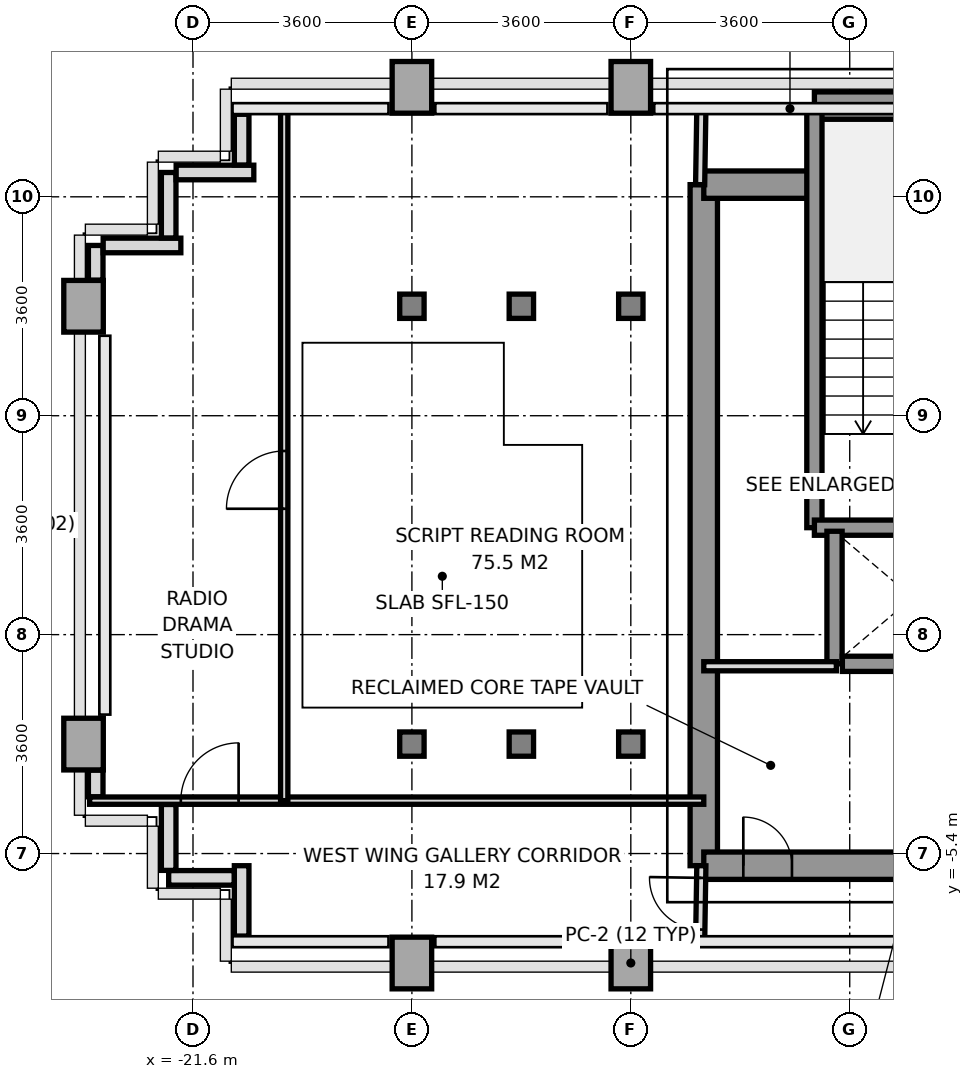
"""IFC4 building model, lengths in metres.
Left out: names, types, materials, properties, quantities, classifications, styles, units other than length and angle.
Written with IfcOpenShell. Run it as: python <this file> out.ifc"""

import sys

from ifc_helpers import new_model, si_unit, direction, frame, frame_2d, origin, origin_2d, place, context, subcontext, project, spatial, rectangle, i_section, extrude, source, transform, mapped, element, fill, save


model = new_model("IFC4")
c1 = context("Model", 3, precision=1e-05, world=origin(), true_north=direction((0.0, 1.0)))
c2 = subcontext(c1, "Body", "Model", "MODEL_VIEW")
j1 = project(units=[si_unit("LENGTHUNIT", "METRE"), si_unit("PLANEANGLEUNIT", "RADIAN")], contexts=[c1])
p1 = place(None, origin())
s1 = spatial("IfcSite", under=j1, at=p1, CompositionType="ELEMENT")
p2 = place(p1, origin())
s2 = spatial("IfcBuilding", under=s1, at=p2, CompositionType="ELEMENT")
p3 = place(p2, frame((0.0, 0.0, 110.8)))
s3 = spatial("IfcBuildingStorey", under=s2, at=p3, CompositionType="ELEMENT", Elevation=110.8)
m1 = source(origin(), c2, "Body", "SweptSolid", [
    extrude(rectangle(XDim=0.65, YDim=0.85, at=origin_2d()), origin(), (0.0, 0.0, 1.0), 3.2),
])
for number, where, z_axis, x_axis in (
    (1, (-23.4, -3.6, 0.0), (0.0, 0.0, 1.0), (1.0, 0.0, 0.0)),
    (2, (-23.4, 3.6, 0.0), (0.0, 0.0, 1.0), (1.0, 0.0, 0.0)),
    (3, (-18.0, -7.2, 0.0), (0.0, 0.0, 1.0), (1.0, 0.0, 0.0)),
):
    element("IfcColumn", number, at=place(p3, frame(where, z_axis=z_axis, x_axis=x_axis)), inside=s3, PredefinedType="COLUMN", context=c2, shape_type="MappedRepresentation", body=[
        mapped(m1, transform((0.0, 0.0, 0.0), x_axis=(1.0, 0.0, 0.0), y_axis=(0.0, 1.0, 0.0), z_axis=(0.0, 0.0, 1.0), scale=1.0)),
    ])
m2 = source(origin(), c2, "Body", "SweptSolid", [
    extrude(i_section(OverallWidth=0.401, OverallDepth=0.399, WebThickness=0.02, FlangeThickness=0.032, at=origin_2d()), origin(), (0.0, 0.0, 1.0), 3.2),
])
for number, where, z_axis, x_axis in (
    (4, (-18.0, -3.6, 0.0), (0.0, 0.0, 1.0), (1.0, 0.0, 0.0)),
    (5, (-18.0, 3.6, 0.0), (0.0, 0.0, 1.0), (1.0, 0.0, 0.0)),
):
    element("IfcColumn", number, at=place(p3, frame(where, z_axis=z_axis, x_axis=x_axis)), inside=s3, PredefinedType="COLUMN", context=c2, shape_type="MappedRepresentation", body=[
        mapped(m2, transform((0.0, 0.0, 0.0), x_axis=(1.0, 0.0, 0.0), y_axis=(0.0, 1.0, 0.0), z_axis=(0.0, 0.0, 1.0), scale=1.0)),
    ])
p4 = place(p3, frame((-18.0, 7.2, 0.0), z_axis=(0.0, 0.0, 1.0), x_axis=(1.0, 0.0, 0.0)))
e6 = element("IfcColumn", 6, at=p4, inside=s3, PredefinedType="COLUMN", context=c2, shape_type="MappedRepresentation", body=[
    mapped(m1, transform((0.0, 0.0, 0.0), x_axis=(1.0, 0.0, 0.0), y_axis=(0.0, 1.0, 0.0), z_axis=(0.0, 0.0, 1.0), scale=1.0)),
])
for number, where, z_axis, x_axis in (
    (7, (-16.2, -3.6, 0.0), (0.0, 0.0, 1.0), (1.0, 0.0, 0.0)),
    (8, (-16.2, 3.6, 0.0), (0.0, 0.0, 1.0), (1.0, 0.0, 0.0)),
):
    element("IfcColumn", number, at=place(p3, frame(where, z_axis=z_axis, x_axis=x_axis)), inside=s3, PredefinedType="COLUMN", context=c2, shape_type="MappedRepresentation", body=[
        mapped(m2, transform((0.0, 0.0, 0.0), x_axis=(1.0, 0.0, 0.0), y_axis=(0.0, 1.0, 0.0), z_axis=(0.0, 0.0, 1.0), scale=1.0)),
    ])
p5 = place(p3, frame((-14.4, -7.2, 0.0), z_axis=(0.0, 0.0, 1.0), x_axis=(1.0, 0.0, 0.0)))
e9 = element("IfcColumn", 9, at=p5, inside=s3, PredefinedType="COLUMN", context=c2, shape_type="MappedRepresentation", body=[
    mapped(m1, transform((0.0, 0.0, 0.0), x_axis=(1.0, 0.0, 0.0), y_axis=(0.0, 1.0, 0.0), z_axis=(0.0, 0.0, 1.0), scale=1.0)),
])
for number, where, z_axis, x_axis in (
    (10, (-14.4, -3.6, 0.0), (0.0, 0.0, 1.0), (1.0, 0.0, 0.0)),
    (11, (-14.4, 3.6, 0.0), (0.0, 0.0, 1.0), (1.0, 0.0, 0.0)),
):
    element("IfcColumn", number, at=place(p3, frame(where, z_axis=z_axis, x_axis=x_axis)), inside=s3, PredefinedType="COLUMN", context=c2, shape_type="MappedRepresentation", body=[
        mapped(m2, transform((0.0, 0.0, 0.0), x_axis=(1.0, 0.0, 0.0), y_axis=(0.0, 1.0, 0.0), z_axis=(0.0, 0.0, 1.0), scale=1.0)),
    ])
p6 = place(p3, frame((-14.4, 7.2, 0.0), z_axis=(0.0, 0.0, 1.0), x_axis=(1.0, 0.0, 0.0)))
e12 = element("IfcColumn", 12, at=p6, inside=s3, PredefinedType="COLUMN", context=c2, shape_type="MappedRepresentation", body=[
    mapped(m1, transform((0.0, 0.0, 0.0), x_axis=(1.0, 0.0, 0.0), y_axis=(0.0, 1.0, 0.0), z_axis=(0.0, 0.0, 1.0), scale=1.0)),
])
p7 = place(p3, frame((-20.8, -6.757, 0.0), z_axis=(0.0, 0.0, 1.0), x_axis=(0.0, 1.0, 0.0)))
e13 = element("IfcWall", 13, at=p7, inside=s3, PredefinedType="PARAPET", context=c2, shape_type="SweptSolid", body=[
    extrude(rectangle(XDim=1.157, YDim=0.24, at=frame_2d((0.579, 0.0))), origin(), (0.0, 0.0, 1.0), 1.15),
])
p8 = place(p3, frame((-20.923, -5.8, 0.0), z_axis=(0.0, 0.0, 1.0), x_axis=(-1.0, 0.0, 0.0)))
e14 = element("IfcWall", 14, at=p8, inside=s3, PredefinedType="PARAPET", context=c2, shape_type="SweptSolid", body=[
    extrude(rectangle(XDim=1.077, YDim=0.24, at=frame_2d((0.539, 0.0))), origin(), (0.0, 0.0, 1.0), 1.15),
])
p9 = place(p3, frame((-22.0, -5.677, 0.0), z_axis=(0.0, 0.0, 1.0), x_axis=(0.0, 1.0, 0.0)))
e15 = element("IfcWall", 15, at=p9, inside=s3, PredefinedType="PARAPET", context=c2, shape_type="SweptSolid", body=[
    extrude(rectangle(XDim=1.084, YDim=0.24, at=frame_2d((0.542, 0.0))), origin(), (0.0, 0.0, 1.0), 1.15),
])
p10 = place(p3, frame((-23.2, -4.467, 0.0), z_axis=(0.0, 0.0, 1.0), x_axis=(0.0, 1.0, 0.0)))
e16 = element("IfcWall", 16, at=p10, inside=s3, PredefinedType="PARAPET", context=c2, shape_type="SweptSolid", body=[
    extrude(rectangle(XDim=0.439, YDim=0.24, at=frame_2d((0.219, 0.0))), origin(), (0.0, 0.0, 1.0), 1.15),
])
p11 = place(p3, frame((-23.2, 4.028, 0.0), z_axis=(0.0, 0.0, 1.0), x_axis=(0.0, 1.0, 0.0)))
e17 = element("IfcWall", 17, at=p11, inside=s3, PredefinedType="PARAPET", context=c2, shape_type="SweptSolid", body=[
    extrude(rectangle(XDim=0.572, YDim=0.24, at=frame_2d((0.286, 0.0))), origin(), (0.0, 0.0, 1.0), 1.15),
])
p12 = place(p3, frame((-23.077, 4.6, 0.0), z_axis=(0.0, 0.0, 1.0), x_axis=(1.0, 0.0, 0.0)))
e18 = element("IfcWall", 18, at=p12, inside=s3, PredefinedType="PARAPET", context=c2, shape_type="SweptSolid", body=[
    extrude(rectangle(XDim=1.277, YDim=0.24, at=frame_2d((0.638, 0.0))), origin(), (0.0, 0.0, 1.0), 1.15),
])
p13 = place(p3, frame((-22.0, 4.723, 0.0), z_axis=(0.0, 0.0, 1.0), x_axis=(0.0, 1.0, 0.0)))
e19 = element("IfcWall", 19, at=p13, inside=s3, PredefinedType="PARAPET", context=c2, shape_type="SweptSolid", body=[
    extrude(rectangle(XDim=1.077, YDim=0.24, at=frame_2d((0.539, 0.0))), origin(), (0.0, 0.0, 1.0), 1.15),
])
p14 = place(p3, frame((-21.877, 5.8, 0.0), z_axis=(0.0, 0.0, 1.0), x_axis=(1.0, 0.0, 0.0)))
e20 = element("IfcWall", 20, at=p14, inside=s3, PredefinedType="PARAPET", context=c2, shape_type="SweptSolid", body=[
    extrude(rectangle(XDim=1.277, YDim=0.24, at=frame_2d((0.638, 0.0))), origin(), (0.0, 0.0, 1.0), 1.15),
])
p15 = place(p3, frame((-20.8, 5.923, 0.0), z_axis=(0.0, 0.0, 1.0), x_axis=(0.0, 1.0, 0.0)))
e21 = element("IfcWall", 21, at=p15, inside=s3, PredefinedType="PARAPET", context=c2, shape_type="SweptSolid", body=[
    extrude(rectangle(XDim=0.834, YDim=0.24, at=frame_2d((0.417, 0.0))), origin(), (0.0, 0.0, 1.0), 1.15),
])
p16 = place(p3, frame((-13.2, -5.6, 0.0), z_axis=(0.0, 0.0, 1.0), x_axis=(0.0, 1.0, 0.0)))
e22 = element("IfcWall", 22, at=p16, inside=s3, PredefinedType="SHEAR", context=c2, shape_type="SweptSolid", body=[
    extrude(rectangle(XDim=11.2, YDim=0.45, at=frame_2d((5.6, 0.0))), origin(), (0.0, 0.0, 1.0), 3.2),
])
p17 = place(p3, frame((-11.381, 6.9, 0.0), z_axis=(0.0, 0.0, 1.0), x_axis=(1.0, 0.0, 0.0)))
e23 = element("IfcWall", 23, at=p17, inside=s3, PredefinedType="SHEAR", context=c2, shape_type="SweptSolid", body=[
    extrude(rectangle(XDim=5.981, YDim=0.45, at=frame_2d((2.991, 0.0))), origin(), (0.0, 0.0, 1.0), 3.2),
])
p18 = place(p3, frame((-13.2, 5.6, 0.0), z_axis=(0.0, 0.0, 1.0), x_axis=(1.0, 0.0, 0.0)))
e24 = element("IfcWall", 24, at=p18, inside=s3, PredefinedType="SHEAR", context=c2, shape_type="SweptSolid", body=[
    extrude(rectangle(XDim=1.819, YDim=0.45, at=frame_2d((0.909, 0.0))), origin(), (0.0, 0.0, 1.0), 3.2),
])
p19 = place(p3, frame((-13.2, -5.6, 0.0), z_axis=(0.0, 0.0, 1.0), x_axis=(1.0, 0.0, 0.0)))
e25 = element("IfcWall", 25, at=p19, inside=s3, PredefinedType="SHEAR", context=c2, shape_type="SweptSolid", body=[
    extrude(rectangle(XDim=7.8, YDim=0.45, at=frame_2d((3.9, 0.0))), origin(), (0.0, 0.0, 1.0), 3.2),
])
p20 = place(p19, frame((3.6, 0.0, 0.0)))
e26 = element("IfcOpeningElement", 26, at=p20, cuts=e25, PredefinedType="OPENING", context=c2, shape_type="SweptSolid", body=[
    extrude(rectangle(XDim=1.2, YDim=2.2, at=frame_2d((0.6, 1.1))), frame((0.0, 0.235, 0.0), z_axis=(0.0, -1.0, 0.0), x_axis=(1.0, 0.0, 0.0)), (0.0, 0.0, 1.0), 0.47),
])
p21 = place(p19, frame((0.65, 0.0, 0.0)))
e27 = element("IfcOpeningElement", 27, at=p21, cuts=e25, PredefinedType="OPENING", context=c2, shape_type="SweptSolid", body=[
    extrude(rectangle(XDim=0.8, YDim=2.1, at=frame_2d((0.4, 1.05))), frame((0.0, 0.235, 0.0), z_axis=(0.0, -1.0, 0.0), x_axis=(1.0, 0.0, 0.0)), (0.0, 0.0, 1.0), 0.47),
])
p22 = place(p3, frame((-11.381, -0.041, 0.0), z_axis=(0.0, 0.0, 1.0), x_axis=(0.0, 1.0, 0.0)))
e28 = element("IfcWall", 28, at=p22, inside=s3, PredefinedType="SOLIDWALL", context=c2, shape_type="SweptSolid", body=[
    extrude(rectangle(XDim=6.941, YDim=0.25, at=frame_2d((3.47, 0.0))), origin(), (0.0, 0.0, 1.0), 3.2),
])
p23 = place(p3, frame((-11.381, -0.041, 0.0), z_axis=(0.0, 0.0, 1.0), x_axis=(1.0, 0.0, 0.0)))
e29 = element("IfcWall", 29, at=p23, inside=s3, PredefinedType="SOLIDWALL", context=c2, shape_type="SweptSolid", body=[
    extrude(rectangle(XDim=3.202, YDim=0.25, at=frame_2d((1.601, 0.0))), origin(), (0.0, 0.0, 1.0), 3.2),
])
p24 = place(p3, frame((-11.05, -2.28, 0.0), z_axis=(0.0, 0.0, 1.0), x_axis=(0.0, 1.0, 0.0)))
e30 = element("IfcWall", 30, at=p24, inside=s3, PredefinedType="SOLIDWALL", context=c2, shape_type="SweptSolid", body=[
    extrude(rectangle(XDim=2.18, YDim=0.25, at=frame_2d((1.09, 0.0))), origin(), (0.0, 0.0, 1.0), 3.2),
])
p25 = place(p3, frame((-10.921, -2.28, 0.0), z_axis=(0.0, 0.0, 1.0), x_axis=(1.0, 0.0, 0.0)))
e31 = element("IfcWall", 31, at=p25, inside=s3, PredefinedType="SOLIDWALL", context=c2, shape_type="SweptSolid", body=[
    extrude(rectangle(XDim=2.312, YDim=0.25, at=frame_2d((1.156, 0.0))), origin(), (0.0, 0.0, 1.0), 3.2),
])
p26 = place(p3, frame((-13.2, -2.32, 0.0), z_axis=(0.0, 0.0, 1.0), x_axis=(1.0, 0.0, 0.0)))
e32 = element("IfcWall", 32, at=p26, inside=s3, PredefinedType="PARTITIONING", context=c2, shape_type="SweptSolid", body=[
    extrude(rectangle(XDim=2.18, YDim=0.15, at=frame_2d((1.09, 0.0))), origin(), (0.0, 0.0, 1.0), 3.2),
])
p27 = place(p3, frame((-13.26, 5.6, 0.0), z_axis=(0.0, 0.0, 1.0), x_axis=(0.016013571389, 0.999871774545, 0.0)))
e33 = element("IfcWall", 33, at=p27, inside=s3, PredefinedType="PARTITIONING", context=c2, shape_type="SweptSolid", body=[
    extrude(rectangle(XDim=1.25, YDim=0.15, at=frame_2d((0.625, 0.0))), origin(), (0.0, 0.0, 1.0), 3.2),
])
p28 = place(p3, frame((-13.26, -6.85, 0.0), z_axis=(0.0, 0.0, 1.0), x_axis=(0.016013571389, 0.999871774545, 0.0)))
e34 = element("IfcWall", 34, at=p28, inside=s3, PredefinedType="PARTITIONING", context=c2, shape_type="SweptSolid", body=[
    extrude(rectangle(XDim=1.25, YDim=0.15, at=frame_2d((0.625, 0.0))), origin(), (0.0, 0.0, 1.0), 3.2),
])
p29 = place(p28, frame((0.2, 0.0, 0.0)))
e35 = element("IfcOpeningElement", 35, at=p29, cuts=e34, PredefinedType="OPENING", context=c2, shape_type="SweptSolid", body=[
    extrude(rectangle(XDim=0.85, YDim=2.1, at=frame_2d((0.425, 1.05))), frame((0.0, 0.085, 0.0), z_axis=(0.0, -1.0, 0.0), x_axis=(1.0, 0.0, 0.0)), (0.0, 0.0, 1.0), 0.17),
])
p30 = place(p3, frame((-23.3, -4.53, 0.0), z_axis=(0.0, 0.0, 1.0), x_axis=(1.0, 0.0, 0.0)))
e36 = element("IfcWall", 36, at=p30, inside=s3, PredefinedType="PARTITIONING", context=c2, shape_type="SweptSolid", body=[
    extrude(rectangle(XDim=10.1, YDim=0.12, at=frame_2d((5.05, 0.0))), origin(), (0.0, 0.0, 1.0), 2.76),
])
p31 = place(p30, frame((1.5, 0.0, 0.0)))
e37 = element("IfcOpeningElement", 37, at=p31, cuts=e36, PredefinedType="OPENING", context=c2, shape_type="SweptSolid", body=[
    extrude(rectangle(XDim=0.95, YDim=2.15, at=frame_2d((0.475, 1.075))), frame((0.0, 0.07, 0.0), z_axis=(0.0, -1.0, 0.0), x_axis=(1.0, 0.0, 0.0)), (0.0, 0.0, 1.0), 0.14),
])
p32 = place(p3, frame((-20.1, -4.53, 0.0), z_axis=(0.0, 0.0, 1.0), x_axis=(0.0, 1.0, 0.0)))
e38 = element("IfcWall", 38, at=p32, inside=s3, PredefinedType="PARTITIONING", context=c2, shape_type="SweptSolid", body=[
    extrude(rectangle(XDim=11.38, YDim=0.12, at=frame_2d((5.69, 0.0))), origin(), (0.0, 0.0, 1.0), 2.7),
])
p33 = place(p32, frame((4.8, 0.0, 0.0)))
e39 = element("IfcOpeningElement", 39, at=p33, cuts=e38, PredefinedType="OPENING", context=c2, shape_type="SweptSolid", body=[
    extrude(rectangle(XDim=0.95, YDim=2.15, at=frame_2d((0.475, 1.075))), frame((0.0, 0.07, 0.0), z_axis=(0.0, -1.0, 0.0), x_axis=(1.0, 0.0, 0.0)), (0.0, 0.0, 1.0), 0.14),
])
m3 = source(origin(), c2, "Body", "SweptSolid", [
    extrude(rectangle(XDim=0.8, YDim=2.1, at=frame_2d((0.4, 1.05))), frame((0.0, 0.025, 0.0), z_axis=(0.0, -1.0, 0.0), x_axis=(1.0, 0.0, 0.0)), (0.0, 0.0, 1.0), 0.05),
])
p34 = place(p21, origin())
e40 = element("IfcDoor", 40, at=p34, inside=s3, OperationType="SINGLE_SWING_LEFT", PredefinedType="DOOR", context=c2, shape_type="MappedRepresentation", body=[
    mapped(m3, transform((0.0, 0.0, 0.0), x_axis=(1.0, 0.0, 0.0), y_axis=(0.0, 1.0, 0.0), z_axis=(0.0, 0.0, 1.0), scale=1.0)),
])
fill(e27, e40)
m4 = source(origin(), c2, "Body", "SweptSolid", [
    extrude(rectangle(XDim=0.85, YDim=2.1, at=frame_2d((0.425, 1.05))), frame((0.0, 0.025, 0.0), z_axis=(0.0, -1.0, 0.0), x_axis=(1.0, 0.0, 0.0)), (0.0, 0.0, 1.0), 0.05),
])
p35 = place(p29, origin())
e41 = element("IfcDoor", 41, at=p35, inside=s3, OperationType="SINGLE_SWING_RIGHT", PredefinedType="DOOR", context=c2, shape_type="MappedRepresentation", body=[
    mapped(m4, transform((0.0, 0.0, 0.0), x_axis=(1.0, 0.0, 0.0), y_axis=(0.0, 1.0, 0.0), z_axis=(0.0, 0.0, 1.0), scale=1.0)),
])
fill(e35, e41)
m5 = source(origin(), c2, "Body", "SweptSolid", [
    extrude(rectangle(XDim=0.95, YDim=2.15, at=frame_2d((0.475, 1.075))), frame((0.0, 0.025, 0.0), z_axis=(0.0, -1.0, 0.0), x_axis=(1.0, 0.0, 0.0)), (0.0, 0.0, 1.0), 0.05),
])
p36 = place(p31, origin())
e42 = element("IfcDoor", 42, at=p36, inside=s3, OperationType="SINGLE_SWING_RIGHT", PredefinedType="DOOR", context=c2, shape_type="MappedRepresentation", body=[
    mapped(m5, transform((0.0, 0.0, 0.0), x_axis=(1.0, 0.0, 0.0), y_axis=(0.0, 1.0, 0.0), z_axis=(0.0, 0.0, 1.0), scale=1.0)),
])
fill(e37, e42)
p37 = place(p33, origin())
e43 = element("IfcDoor", 43, at=p37, inside=s3, OperationType="SINGLE_SWING_LEFT", PredefinedType="DOOR", context=c2, shape_type="MappedRepresentation", body=[
    mapped(m5, transform((0.0, 0.0, 0.0), x_axis=(1.0, 0.0, 0.0), y_axis=(0.0, 1.0, 0.0), z_axis=(0.0, 0.0, 1.0), scale=1.0)),
])
fill(e39, e43)
save(model, sys.argv[1])
